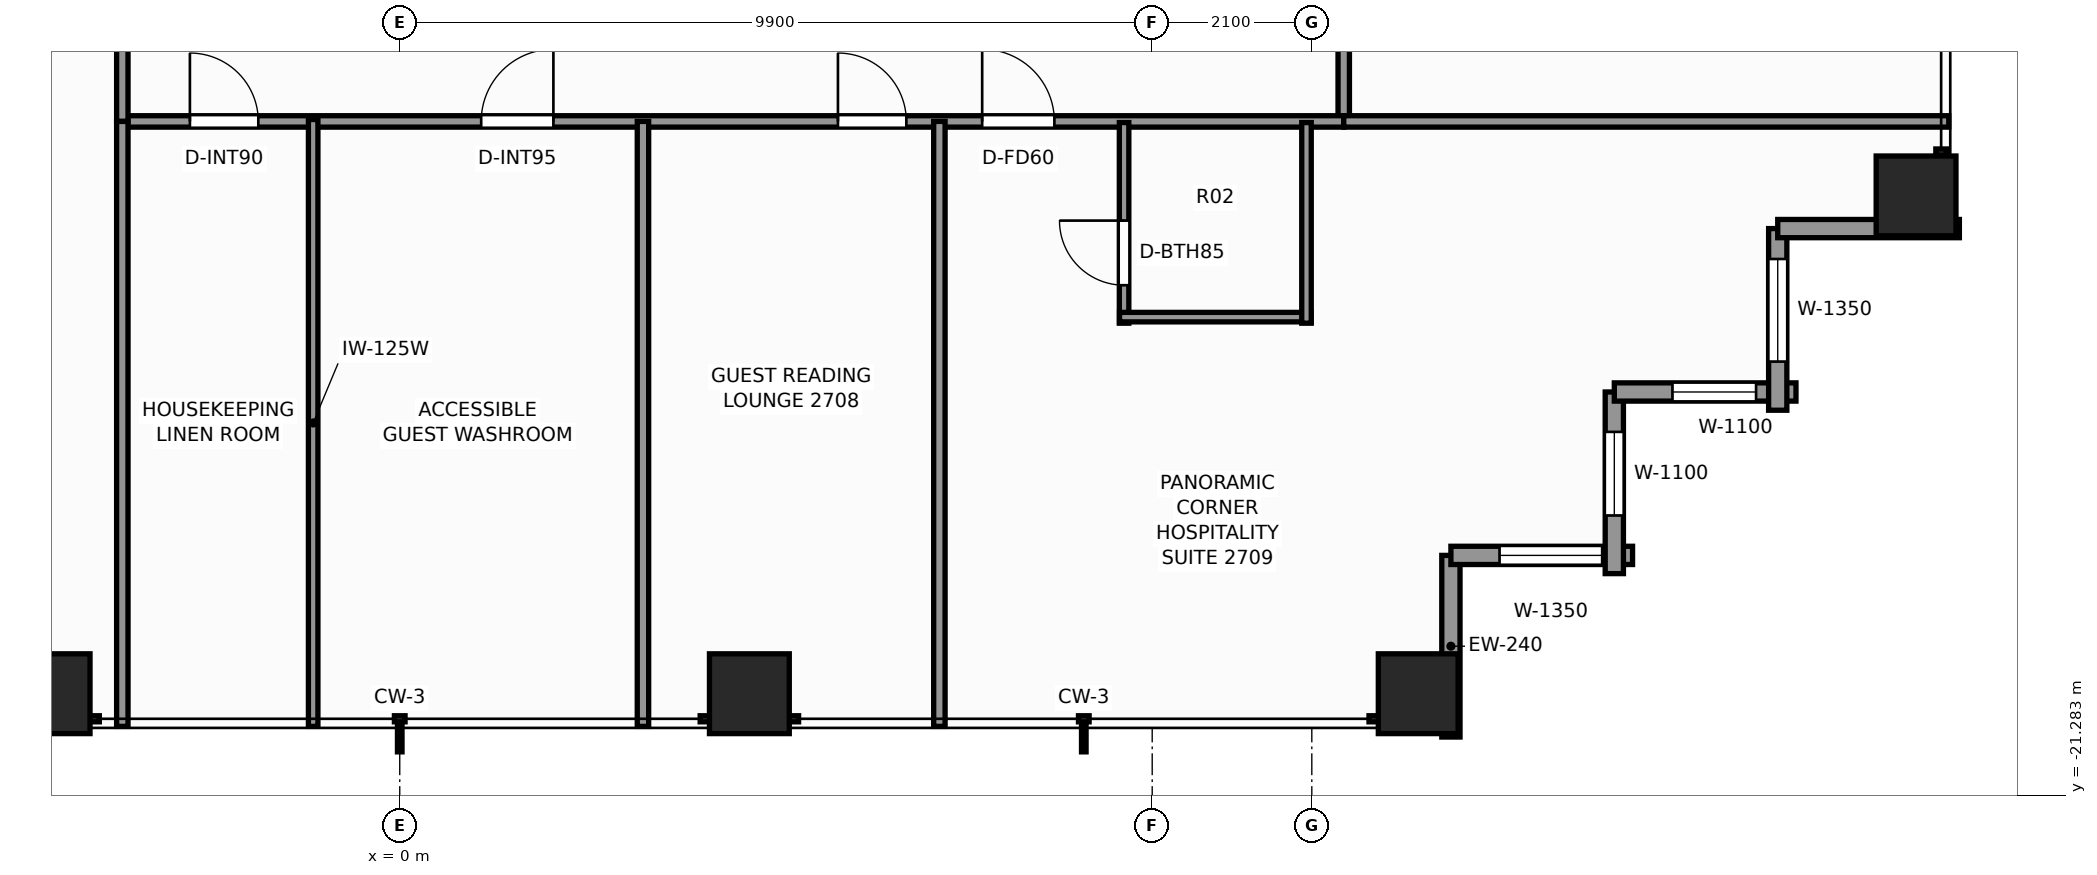
"""IFC4 building model, lengths in metres.
Left out: names, types, materials, properties, quantities, classifications, styles, units other than length and angle.
Written with IfcOpenShell. Run it as: python <this file> out.ifc"""

import sys

from ifc_helpers import new_model, si_unit, direction, frame, frame_2d, origin, origin_2d, place, context, subcontext, project, spatial, rectangle, extrude, element, fill, save


model = new_model("IFC4")
c1 = context("Model", 3, precision=1e-05, world=origin(), true_north=direction((0.0, 1.0)))
c2 = subcontext(c1, "Body", "Model", "MODEL_VIEW")
j1 = project(units=[si_unit("LENGTHUNIT", "METRE"), si_unit("PLANEANGLEUNIT", "RADIAN")], contexts=[c1])
p1 = place(None, origin())
s1 = spatial("IfcSite", under=j1, at=p1, CompositionType="ELEMENT")
p2 = place(p1, origin())
s2 = spatial("IfcBuilding", under=s1, at=p2, CompositionType="ELEMENT")
p3 = place(p2, frame((0.0, 0.0, 95.3)))
s3 = spatial("IfcBuildingStorey", under=s2, at=p3, CompositionType="ELEMENT", Elevation=95.3)
for number, where, z_axis, x_axis in (
    (1, (-4.6, -19.95, 0.0), (0.0, 0.0, 1.0), (1.0, 0.0, 0.0)),
    (2, (4.6, -19.95, 0.0), (0.0, 0.0, 1.0), (1.0, 0.0, 0.0)),
    (3, (13.4, -19.95, 0.0), (0.0, 0.0, 1.0), (1.0, 0.0, 0.0)),
    (4, (19.95, -13.4, 0.0), (0.0, 0.0, 1.0), (1.0, 0.0, 0.0)),
):
    element("IfcColumn", number, at=place(p3, frame(where, z_axis=z_axis, x_axis=x_axis)), inside=s3, PredefinedType="COLUMN", context=c2, shape_type="SweptSolid", body=[
        extrude(rectangle(XDim=1.05, YDim=1.05, at=origin_2d()), origin(), (0.0, 0.0, 1.0), 3.3),
    ])
p4 = place(p3, frame((13.83, -18.13, 0.0), z_axis=(0.0, 0.0, 1.0), x_axis=(0.0, -1.0, 0.0)))
e5 = element("IfcWall", 5, at=p4, inside=s3, PredefinedType="STANDARD", context=c2, shape_type="SweptSolid", body=[
    extrude(rectangle(XDim=2.39, YDim=0.24, at=frame_2d((1.195, 0.0))), origin(), (0.0, 0.0, 1.0), 2.459),
])
p5 = place(p3, frame((16.22, -18.13, 0.0), z_axis=(0.0, 0.0, 1.0), x_axis=(-1.0, 0.0, 0.0)))
e6 = element("IfcWall", 6, at=p5, inside=s3, PredefinedType="STANDARD", context=c2, shape_type="SweptSolid", body=[
    extrude(rectangle(XDim=2.39, YDim=0.24, at=frame_2d((1.195, 0.0))), origin(), (0.0, 0.0, 1.0), 2.459),
])
p6 = place(p5, frame((0.4, 0.0, 0.65)))
e7 = element("IfcOpeningElement", 7, at=p6, cuts=e6, PredefinedType="OPENING", context=c2, shape_type="SweptSolid", body=[
    extrude(rectangle(XDim=1.35, YDim=1.55, at=frame_2d((0.675, 0.775))), frame((0.0, 0.13, 0.0), z_axis=(0.0, -1.0, 0.0), x_axis=(1.0, 0.0, 0.0)), (0.0, 0.0, 1.0), 0.26),
])
p7 = place(p3, frame((15.98, -15.98, 0.0), z_axis=(0.0, 0.0, 1.0), x_axis=(0.0, -1.0, 0.0)))
e8 = element("IfcWall", 8, at=p7, inside=s3, PredefinedType="STANDARD", context=c2, shape_type="SweptSolid", body=[
    extrude(rectangle(XDim=2.39, YDim=0.24, at=frame_2d((1.195, 0.0))), origin(), (0.0, 0.0, 1.0), 2.459),
])
p8 = place(p7, frame((0.525, 0.0, 0.65)))
e9 = element("IfcOpeningElement", 9, at=p8, cuts=e8, PredefinedType="OPENING", context=c2, shape_type="SweptSolid", body=[
    extrude(rectangle(XDim=1.1, YDim=1.45, at=frame_2d((0.55, 0.725))), frame((0.0, 0.13, 0.0), z_axis=(0.0, -1.0, 0.0), x_axis=(1.0, 0.0, 0.0)), (0.0, 0.0, 1.0), 0.26),
])
p9 = place(p3, frame((18.37, -15.98, 0.0), z_axis=(0.0, 0.0, 1.0), x_axis=(-1.0, 0.0, 0.0)))
e10 = element("IfcWall", 10, at=p9, inside=s3, PredefinedType="STANDARD", context=c2, shape_type="SweptSolid", body=[
    extrude(rectangle(XDim=2.39, YDim=0.24, at=frame_2d((1.195, 0.0))), origin(), (0.0, 0.0, 1.0), 2.459),
])
p10 = place(p9, frame((0.525, 0.0, 0.65)))
e11 = element("IfcOpeningElement", 11, at=p10, cuts=e10, PredefinedType="OPENING", context=c2, shape_type="SweptSolid", body=[
    extrude(rectangle(XDim=1.1, YDim=1.45, at=frame_2d((0.55, 0.725))), frame((0.0, 0.13, 0.0), z_axis=(0.0, -1.0, 0.0), x_axis=(1.0, 0.0, 0.0)), (0.0, 0.0, 1.0), 0.26),
])
p11 = place(p3, frame((18.13, -13.83, 0.0), z_axis=(0.0, 0.0, 1.0), x_axis=(0.0, -1.0, 0.0)))
e12 = element("IfcWall", 12, at=p11, inside=s3, PredefinedType="STANDARD", context=c2, shape_type="SweptSolid", body=[
    extrude(rectangle(XDim=2.39, YDim=0.24, at=frame_2d((1.195, 0.0))), origin(), (0.0, 0.0, 1.0), 2.459),
])
p12 = place(p11, frame((0.4, 0.0, 0.65)))
e13 = element("IfcOpeningElement", 13, at=p12, cuts=e12, PredefinedType="OPENING", context=c2, shape_type="SweptSolid", body=[
    extrude(rectangle(XDim=1.35, YDim=1.55, at=frame_2d((0.675, 0.775))), frame((0.0, 0.13, 0.0), z_axis=(0.0, -1.0, 0.0), x_axis=(1.0, 0.0, 0.0)), (0.0, 0.0, 1.0), 0.26),
])
p13 = place(p3, frame((20.52, -13.83, 0.0), z_axis=(0.0, 0.0, 1.0), x_axis=(-1.0, 0.0, 0.0)))
e14 = element("IfcWall", 14, at=p13, inside=s3, PredefinedType="STANDARD", context=c2, shape_type="SweptSolid", body=[
    extrude(rectangle(XDim=2.39, YDim=0.24, at=frame_2d((1.195, 0.0))), origin(), (0.0, 0.0, 1.0), 2.459),
])
p14 = place(p3, frame((12.42, -12.42, 0.0), z_axis=(0.0, 0.0, 1.0), x_axis=(0.0, 1.0, 0.0)))
e15 = element("IfcWall", 15, at=p14, inside=s3, PredefinedType="PARTITIONING", context=c2, shape_type="SweptSolid", body=[
    extrude(rectangle(XDim=24.84, YDim=0.15, at=frame_2d((12.42, 0.0))), origin(), (0.0, 0.0, 1.0), 2.292),
])
p15 = place(p14, frame((4.435, 0.0, 0.0)))
e16 = element("IfcOpeningElement", 16, at=p15, cuts=e15, PredefinedType="OPENING", context=c2, shape_type="SweptSolid", body=[
    extrude(rectangle(XDim=0.9, YDim=2.06, at=frame_2d((0.45, 1.03))), frame((0.0, 0.085, 0.0), z_axis=(0.0, -1.0, 0.0), x_axis=(1.0, 0.0, 0.0)), (0.0, 0.0, 1.0), 0.17),
])
p16 = place(p14, frame((19.505, 0.0, 0.0)))
e17 = element("IfcOpeningElement", 17, at=p16, cuts=e15, PredefinedType="OPENING", context=c2, shape_type="SweptSolid", body=[
    extrude(rectangle(XDim=0.9, YDim=2.06, at=frame_2d((0.45, 1.03))), frame((0.0, 0.085, 0.0), z_axis=(0.0, -1.0, 0.0), x_axis=(1.0, 0.0, 0.0)), (0.0, 0.0, 1.0), 0.17),
])
p17 = place(p3, frame((-3.65, -12.42, 0.0), z_axis=(0.0, 0.0, 1.0), x_axis=(1.0, 0.0, 0.0)))
e18 = element("IfcWall", 18, at=p17, inside=s3, PredefinedType="PARTITIONING", context=c2, shape_type="SweptSolid", body=[
    extrude(rectangle(XDim=16.07, YDim=0.15, at=frame_2d((8.035, 0.0))), origin(), (0.0, 0.0, 1.0), 2.292),
])
p18 = place(p17, frame((0.889, 0.0, 0.0)))
e19 = element("IfcOpeningElement", 19, at=p18, cuts=e18, PredefinedType="OPENING", context=c2, shape_type="SweptSolid", body=[
    extrude(rectangle(XDim=0.9, YDim=2.06, at=frame_2d((0.45, 1.03))), frame((0.0, 0.085, 0.0), z_axis=(0.0, -1.0, 0.0), x_axis=(1.0, 0.0, 0.0)), (0.0, 0.0, 1.0), 0.17),
])
p19 = place(p17, frame((4.722, 0.0, 0.0)))
e20 = element("IfcOpeningElement", 20, at=p19, cuts=e18, PredefinedType="OPENING", context=c2, shape_type="SweptSolid", body=[
    extrude(rectangle(XDim=0.95, YDim=2.06, at=frame_2d((0.475, 1.03))), frame((0.0, 0.085, 0.0), z_axis=(0.0, -1.0, 0.0), x_axis=(1.0, 0.0, 0.0)), (0.0, 0.0, 1.0), 0.17),
])
p20 = place(p17, frame((9.415, 0.0, 0.0)))
e21 = element("IfcOpeningElement", 21, at=p20, cuts=e18, PredefinedType="OPENING", context=c2, shape_type="SweptSolid", body=[
    extrude(rectangle(XDim=0.9, YDim=2.06, at=frame_2d((0.45, 1.03))), frame((0.0, 0.085, 0.0), z_axis=(0.0, -1.0, 0.0), x_axis=(1.0, 0.0, 0.0)), (0.0, 0.0, 1.0), 0.17),
])
p21 = place(p17, frame((11.313, 0.0, 0.0)))
e22 = element("IfcOpeningElement", 22, at=p21, cuts=e18, PredefinedType="OPENING", context=c2, shape_type="SweptSolid", body=[
    extrude(rectangle(XDim=0.95, YDim=2.06, at=frame_2d((0.475, 1.03))), frame((0.0, 0.085, 0.0), z_axis=(0.0, -1.0, 0.0), x_axis=(1.0, 0.0, 0.0)), (0.0, 0.0, 1.0), 0.17),
])
p22 = place(p3, frame((-3.65, -12.42, 0.0), z_axis=(0.0, 0.0, 1.0), x_axis=(0.0, 1.0, 0.0)))
e23 = element("IfcWall", 23, at=p22, inside=s3, PredefinedType="PARTITIONING", context=c2, shape_type="SweptSolid", body=[
    extrude(rectangle(XDim=2.52, YDim=0.15, at=frame_2d((1.26, 0.0))), origin(), (0.0, 0.0, 1.0), 3.08),
])
p23 = place(p3, frame((12.42, -12.42, 0.0), z_axis=(0.0, 0.0, 1.0), x_axis=(1.0, 0.0, 0.0)))
e24 = element("IfcWall", 24, at=p23, inside=s3, PredefinedType="PARTITIONING", context=c2, shape_type="SweptSolid", body=[
    extrude(rectangle(XDim=7.96, YDim=0.15, at=frame_2d((3.98, 0.0))), origin(), (0.0, 0.0, 1.0), 2.292),
])
p24 = place(p3, frame((-3.65, -20.38, 0.0), z_axis=(0.0, 0.0, 1.0), x_axis=(0.0, 1.0, 0.0)))
e25 = element("IfcWall", 25, at=p24, inside=s3, PredefinedType="PARTITIONING", context=c2, shape_type="SweptSolid", body=[
    extrude(rectangle(XDim=7.96, YDim=0.15, at=frame_2d((3.98, 0.0))), origin(), (0.0, 0.0, 1.0), 2.449),
])
p25 = place(p3, frame((3.2, -20.38, 0.0), z_axis=(0.0, 0.0, 1.0), x_axis=(0.0, 1.0, 0.0)))
e26 = element("IfcWall", 26, at=p25, inside=s3, PredefinedType="PARTITIONING", context=c2, shape_type="SweptSolid", body=[
    extrude(rectangle(XDim=7.96, YDim=0.15, at=frame_2d((3.98, 0.0))), origin(), (0.0, 0.0, 1.0), 2.369),
])
p26 = place(p3, frame((-1.139, -20.38, 0.0), z_axis=(0.0, 0.0, 1.0), x_axis=(0.0, 1.0, 0.0)))
e27 = element("IfcWall", 27, at=p26, inside=s3, PredefinedType="PARTITIONING", context=c2, shape_type="SweptSolid", body=[
    extrude(rectangle(XDim=7.985, YDim=0.125, at=frame_2d((3.992, 0.0))), origin(), (0.0, 0.0, 1.0), 2.449),
])
p27 = place(p3, frame((7.1, -20.38, 0.0), z_axis=(0.0, 0.0, 1.0), x_axis=(0.0, 1.0, 0.0)))
e28 = element("IfcWall", 28, at=p27, inside=s3, PredefinedType="PARTITIONING", context=c2, shape_type="SweptSolid", body=[
    extrude(rectangle(XDim=7.96, YDim=0.15, at=frame_2d((3.98, 0.0))), origin(), (0.0, 0.0, 1.0), 2.449),
])
p28 = place(p3, frame((9.53, -15.075, 0.0), z_axis=(0.0, 0.0, 1.0), x_axis=(0.0, 1.0, 0.0)))
e29 = element("IfcWall", 29, at=p28, inside=s3, PredefinedType="PARTITIONING", context=c2, shape_type="SweptSolid", body=[
    extrude(rectangle(XDim=2.64, YDim=0.125, at=frame_2d((1.32, 0.0))), origin(), (0.0, 0.0, 1.0), 3.08),
])
p29 = place(p28, frame((0.5, 0.0, 0.0)))
e30 = element("IfcOpeningElement", 30, at=p29, cuts=e29, PredefinedType="OPENING", context=c2, shape_type="SweptSolid", body=[
    extrude(rectangle(XDim=0.85, YDim=2.03, at=frame_2d((0.425, 1.015))), frame((0.0, 0.073, 0.0), z_axis=(0.0, -1.0, 0.0), x_axis=(1.0, 0.0, 0.0)), (0.0, 0.0, 1.0), 0.145),
])
p30 = place(p3, frame((9.47, -14.995, 0.0), z_axis=(0.0, 0.0, 1.0), x_axis=(1.0, 0.0, 0.0)))
e31 = element("IfcWall", 31, at=p30, inside=s3, PredefinedType="PARTITIONING", context=c2, shape_type="SweptSolid", body=[
    extrude(rectangle(XDim=2.52, YDim=0.125, at=frame_2d((1.26, 0.0))), origin(), (0.0, 0.0, 1.0), 2.292),
])
p31 = place(p3, frame((11.93, -15.075, 0.0), z_axis=(0.0, 0.0, 1.0), x_axis=(0.0, 1.0, 0.0)))
e32 = element("IfcWall", 32, at=p31, inside=s3, PredefinedType="PARTITIONING", context=c2, shape_type="SweptSolid", body=[
    extrude(rectangle(XDim=2.64, YDim=0.125, at=frame_2d((1.32, 0.0))), origin(), (0.0, 0.0, 1.0), 2.292),
])
p32 = place(p6, origin())
e33 = element("IfcWindow", 33, at=p32, inside=s3, PartitioningType="SINGLE_PANEL", PredefinedType="WINDOW", context=c2, shape_type="SweptSolid", body=[
    extrude(rectangle(XDim=1.35, YDim=1.55, at=frame_2d((0.675, 0.775))), frame((0.0, 0.03, 0.0), z_axis=(0.0, -1.0, 0.0), x_axis=(1.0, 0.0, 0.0)), (0.0, 0.0, 1.0), 0.06),
])
fill(e7, e33)
p33 = place(p8, origin())
e34 = element("IfcWindow", 34, at=p33, inside=s3, PartitioningType="SINGLE_PANEL", PredefinedType="WINDOW", context=c2, shape_type="SweptSolid", body=[
    extrude(rectangle(XDim=1.1, YDim=1.45, at=frame_2d((0.55, 0.725))), frame((0.0, 0.03, 0.0), z_axis=(0.0, -1.0, 0.0), x_axis=(1.0, 0.0, 0.0)), (0.0, 0.0, 1.0), 0.06),
])
fill(e9, e34)
p34 = place(p10, origin())
e35 = element("IfcWindow", 35, at=p34, inside=s3, PartitioningType="SINGLE_PANEL", PredefinedType="WINDOW", context=c2, shape_type="SweptSolid", body=[
    extrude(rectangle(XDim=1.1, YDim=1.45, at=frame_2d((0.55, 0.725))), frame((0.0, 0.03, 0.0), z_axis=(0.0, -1.0, 0.0), x_axis=(1.0, 0.0, 0.0)), (0.0, 0.0, 1.0), 0.06),
])
fill(e11, e35)
p35 = place(p12, origin())
e36 = element("IfcWindow", 36, at=p35, inside=s3, PartitioningType="SINGLE_PANEL", PredefinedType="WINDOW", context=c2, shape_type="SweptSolid", body=[
    extrude(rectangle(XDim=1.35, YDim=1.55, at=frame_2d((0.675, 0.775))), frame((0.0, 0.03, 0.0), z_axis=(0.0, -1.0, 0.0), x_axis=(1.0, 0.0, 0.0)), (0.0, 0.0, 1.0), 0.06),
])
fill(e13, e36)
p36 = place(p18, origin())
e37 = element("IfcDoor", 37, at=p36, inside=s3, OperationType="SINGLE_SWING_LEFT", PredefinedType="DOOR", context=c2, shape_type="SweptSolid", body=[
    extrude(rectangle(XDim=0.9, YDim=2.06, at=frame_2d((0.45, 1.03))), frame((0.0, 0.025, 0.0), z_axis=(0.0, -1.0, 0.0), x_axis=(1.0, 0.0, 0.0)), (0.0, 0.0, 1.0), 0.05),
])
fill(e19, e37)
p37 = place(p19, origin())
e38 = element("IfcDoor", 38, at=p37, inside=s3, OperationType="SINGLE_SWING_RIGHT", PredefinedType="DOOR", context=c2, shape_type="SweptSolid", body=[
    extrude(rectangle(XDim=0.95, YDim=2.06, at=frame_2d((0.475, 1.03))), frame((0.0, 0.025, 0.0), z_axis=(0.0, -1.0, 0.0), x_axis=(1.0, 0.0, 0.0)), (0.0, 0.0, 1.0), 0.05),
])
fill(e20, e38)
p38 = place(p20, origin())
e39 = element("IfcDoor", 39, at=p38, inside=s3, OperationType="SINGLE_SWING_LEFT", PredefinedType="DOOR", context=c2, shape_type="SweptSolid", body=[
    extrude(rectangle(XDim=0.9, YDim=2.06, at=frame_2d((0.45, 1.03))), frame((0.0, 0.025, 0.0), z_axis=(0.0, -1.0, 0.0), x_axis=(1.0, 0.0, 0.0)), (0.0, 0.0, 1.0), 0.05),
])
fill(e21, e39)
p39 = place(p29, origin())
e40 = element("IfcDoor", 40, at=p39, inside=s3, OperationType="SINGLE_SWING_RIGHT", PredefinedType="DOOR", context=c2, shape_type="SweptSolid", body=[
    extrude(rectangle(XDim=0.85, YDim=2.03, at=frame_2d((0.425, 1.015))), frame((0.0, 0.025, 0.0), z_axis=(0.0, -1.0, 0.0), x_axis=(1.0, 0.0, 0.0)), (0.0, 0.0, 1.0), 0.05),
])
fill(e30, e40)
p40 = place(p21, origin())
e41 = element("IfcDoor", 41, at=p40, inside=s3, OperationType="SINGLE_SWING_LEFT", PredefinedType="DOOR", context=c2, shape_type="SweptSolid", body=[
    extrude(rectangle(XDim=0.95, YDim=2.06, at=frame_2d((0.475, 1.03))), frame((0.0, 0.025, 0.0), z_axis=(0.0, -1.0, 0.0), x_axis=(1.0, 0.0, 0.0)), (0.0, 0.0, 1.0), 0.05),
])
fill(e22, e41)
save(model, sys.argv[1])
